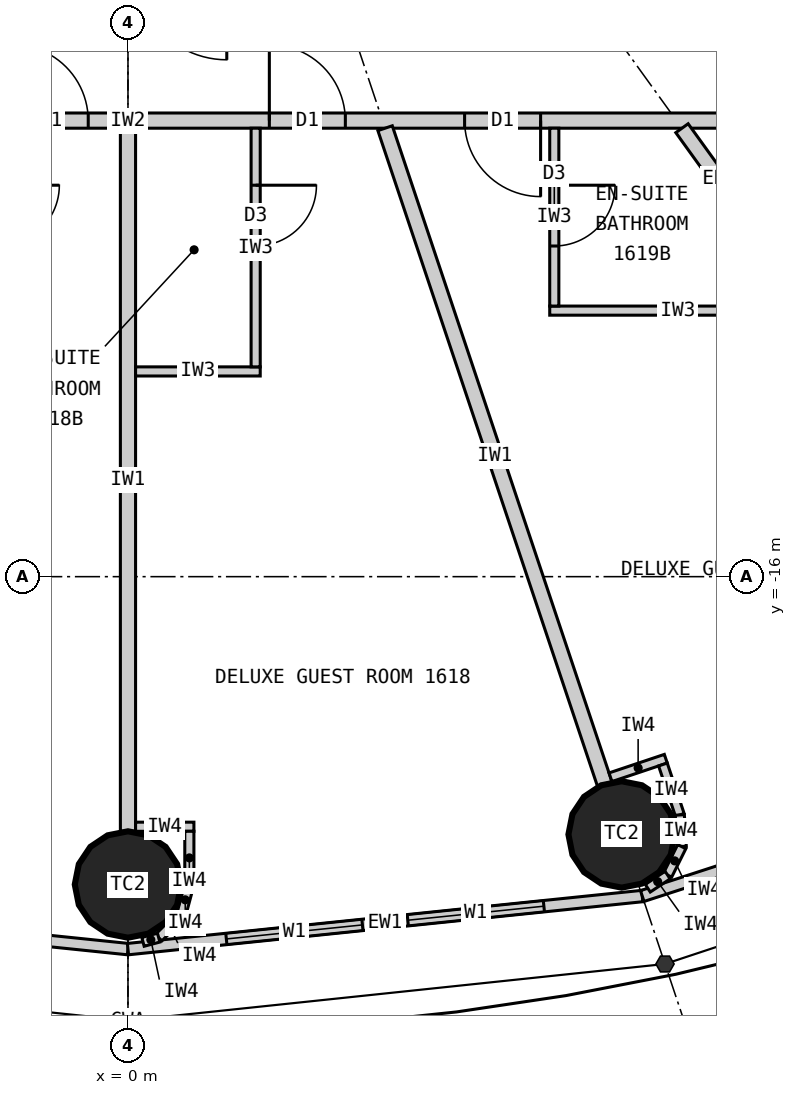
"""IFC4 building model, lengths in metres.
Left out: names, types, materials, properties, quantities, classifications, styles, units other than length and angle.
Written with IfcOpenShell. Run it as: python <this file> out.ifc"""

import sys

from ifc_helpers import new_model, si_unit, direction, frame, frame_2d, origin, origin_2d, place, context, subcontext, project, spatial, rectangle, circle, extrude, element, fill, save


model = new_model("IFC4")
c1 = context("Model", 3, precision=1e-05, world=origin(), true_north=direction((0.0, 1.0)))
c2 = subcontext(c1, "Body", "Model", "MODEL_VIEW")
j1 = project(units=[si_unit("LENGTHUNIT", "METRE"), si_unit("PLANEANGLEUNIT", "RADIAN")], contexts=[c1])
p1 = place(None, origin())
s1 = spatial("IfcSite", under=j1, at=p1, CompositionType="ELEMENT")
p2 = place(p1, origin())
s2 = spatial("IfcBuilding", under=s1, at=p2, CompositionType="ELEMENT")
p3 = place(p2, frame((0.0, 0.0, 67.2)))
s3 = spatial("IfcBuildingStorey", under=s2, at=p3, CompositionType="ELEMENT", Elevation=67.2)
for number, where, z_axis, x_axis in (
    (1, (0.0, -20.05, 0.0), (0.0, 0.0, 1.0), (1.0, 0.0, 0.0)),
    (2, (6.495, -19.391, 0.0), (0.0, 0.0, 1.0), (1.0, 0.0, 0.0)),
):
    element("IfcColumn", number, at=place(p3, frame(where, z_axis=z_axis, x_axis=x_axis)), inside=s3, PredefinedType="COLUMN", context=c2, shape_type="SweptSolid", body=[
        extrude(circle(Radius=0.7, at=origin_2d()), origin(), (0.0, 0.0, 1.0), 3.3),
    ])
p4 = place(p3, frame((-6.766, -20.202, 0.0), z_axis=(0.0, 0.0, 1.0), x_axis=(0.994721394369, -0.102612609291, 0.0)))
e3 = element("IfcWall", 3, at=p4, inside=s3, PredefinedType="ELEMENTEDWALL", context=c2, shape_type="SweptSolid", body=[
    extrude(rectangle(XDim=6.802, YDim=0.15, at=frame_2d((3.401, 0.0))), origin(), (0.0, 0.0, 1.0), 3.12),
])
p5 = place(p4, frame((1.301, 0.0, 0.9)))
e4 = element("IfcOpeningElement", 4, at=p5, cuts=e3, PredefinedType="OPENING", context=c2, shape_type="SweptSolid", body=[
    extrude(rectangle(XDim=1.8, YDim=1.9, at=frame_2d((0.9, 0.95))), frame((0.0, 0.085, 0.0), z_axis=(0.0, -1.0, 0.0), x_axis=(1.0, 0.0, 0.0)), (0.0, 0.0, 1.0), 0.17),
])
p6 = place(p4, frame((3.701, 0.0, 0.9)))
e5 = element("IfcOpeningElement", 5, at=p6, cuts=e3, PredefinedType="OPENING", context=c2, shape_type="SweptSolid", body=[
    extrude(rectangle(XDim=1.8, YDim=1.9, at=frame_2d((0.9, 0.95))), frame((0.0, 0.085, 0.0), z_axis=(0.0, -1.0, 0.0), x_axis=(1.0, 0.0, 0.0)), (0.0, 0.0, 1.0), 0.17),
])
p7 = place(p3, frame((0.0, -20.9, 0.0), z_axis=(0.0, 0.0, 1.0), x_axis=(0.994721394369, 0.102612609291, 0.0)))
e6 = element("IfcWall", 6, at=p7, inside=s3, PredefinedType="ELEMENTEDWALL", context=c2, shape_type="SweptSolid", body=[
    extrude(rectangle(XDim=6.802, YDim=0.15, at=frame_2d((3.401, 0.0))), origin(), (0.0, 0.0, 1.0), 3.12),
])
p8 = place(p7, frame((1.301, 0.0, 0.9)))
e7 = element("IfcOpeningElement", 7, at=p8, cuts=e6, PredefinedType="OPENING", context=c2, shape_type="SweptSolid", body=[
    extrude(rectangle(XDim=1.8, YDim=1.9, at=frame_2d((0.9, 0.95))), frame((0.0, 0.085, 0.0), z_axis=(0.0, -1.0, 0.0), x_axis=(1.0, 0.0, 0.0)), (0.0, 0.0, 1.0), 0.17),
])
p9 = place(p7, frame((3.701, 0.0, 0.9)))
e8 = element("IfcOpeningElement", 8, at=p9, cuts=e6, PredefinedType="OPENING", context=c2, shape_type="SweptSolid", body=[
    extrude(rectangle(XDim=1.8, YDim=1.9, at=frame_2d((0.9, 0.95))), frame((0.0, 0.085, 0.0), z_axis=(0.0, -1.0, 0.0), x_axis=(1.0, 0.0, 0.0)), (0.0, 0.0, 1.0), 0.17),
])
p10 = place(p3, frame((6.766, -20.202, 0.0), z_axis=(0.0, 0.0, 1.0), x_axis=(0.951137534625, 0.308767534285, 0.0)))
e9 = element("IfcWall", 9, at=p10, inside=s3, PredefinedType="ELEMENTEDWALL", context=c2, shape_type="SweptSolid", body=[
    extrude(rectangle(XDim=6.655, YDim=0.15, at=frame_2d((3.328, 0.0))), origin(), (0.0, 0.0, 1.0), 3.12),
])
p11 = place(p10, frame((1.228, 0.0, 0.9)))
e10 = element("IfcOpeningElement", 10, at=p11, cuts=e9, PredefinedType="OPENING", context=c2, shape_type="SweptSolid", body=[
    extrude(rectangle(XDim=1.8, YDim=1.9, at=frame_2d((0.9, 0.95))), frame((0.0, 0.085, 0.0), z_axis=(0.0, -1.0, 0.0), x_axis=(1.0, 0.0, 0.0)), (0.0, 0.0, 1.0), 0.17),
])
p12 = place(p10, frame((3.628, 0.0, 0.9)))
e11 = element("IfcOpeningElement", 11, at=p12, cuts=e9, PredefinedType="OPENING", context=c2, shape_type="SweptSolid", body=[
    extrude(rectangle(XDim=1.8, YDim=1.9, at=frame_2d((0.9, 0.95))), frame((0.0, 0.085, 0.0), z_axis=(0.0, -1.0, 0.0), x_axis=(1.0, 0.0, 0.0)), (0.0, 0.0, 1.0), 0.17),
])
p13 = place(p3, frame((14.1, -10.0, 0.0), z_axis=(0.0, 0.0, 1.0), x_axis=(-1.0, 0.0, 0.0)))
e12 = element("IfcWall", 12, at=p13, inside=s3, PredefinedType="PARTITIONING", context=c2, shape_type="SweptSolid", body=[
    extrude(rectangle(XDim=28.2, YDim=0.2, at=frame_2d((14.1, 0.0))), origin(), (0.0, 0.0, 1.0), 3.12),
])
p14 = place(p13, frame((23.865, 0.0, 0.0)))
e13 = element("IfcOpeningElement", 13, at=p14, cuts=e12, PredefinedType="OPENING", context=c2, shape_type="SweptSolid", body=[
    extrude(rectangle(XDim=1.0, YDim=2.2, at=frame_2d((0.5, 1.1))), frame((0.0, 0.11, 0.0), z_axis=(0.0, -1.0, 0.0), x_axis=(1.0, 0.0, 0.0)), (0.0, 0.0, 1.0), 0.22),
])
p15 = place(p13, frame((18.529, 0.0, 0.0)))
e14 = element("IfcOpeningElement", 14, at=p15, cuts=e12, PredefinedType="OPENING", context=c2, shape_type="SweptSolid", body=[
    extrude(rectangle(XDim=1.0, YDim=2.2, at=frame_2d((0.5, 1.1))), frame((0.0, 0.11, 0.0), z_axis=(0.0, -1.0, 0.0), x_axis=(1.0, 0.0, 0.0)), (0.0, 0.0, 1.0), 0.22),
])
p16 = place(p13, frame((14.623, 0.0, 0.0)))
e15 = element("IfcOpeningElement", 15, at=p16, cuts=e12, PredefinedType="OPENING", context=c2, shape_type="SweptSolid", body=[
    extrude(rectangle(XDim=1.0, YDim=2.2, at=frame_2d((0.5, 1.1))), frame((0.0, 0.11, 0.0), z_axis=(0.0, -1.0, 0.0), x_axis=(1.0, 0.0, 0.0)), (0.0, 0.0, 1.0), 0.22),
])
p17 = place(p13, frame((11.24, 0.0, 0.0)))
e16 = element("IfcOpeningElement", 16, at=p17, cuts=e12, PredefinedType="OPENING", context=c2, shape_type="SweptSolid", body=[
    extrude(rectangle(XDim=1.0, YDim=2.2, at=frame_2d((0.5, 1.1))), frame((0.0, 0.11, 0.0), z_axis=(0.0, -1.0, 0.0), x_axis=(1.0, 0.0, 0.0)), (0.0, 0.0, 1.0), 0.22),
])
p18 = place(p13, frame((8.671, 0.0, 0.0)))
e17 = element("IfcOpeningElement", 17, at=p18, cuts=e12, PredefinedType="OPENING", context=c2, shape_type="SweptSolid", body=[
    extrude(rectangle(XDim=1.0, YDim=2.2, at=frame_2d((0.5, 1.1))), frame((0.0, 0.11, 0.0), z_axis=(0.0, -1.0, 0.0), x_axis=(1.0, 0.0, 0.0)), (0.0, 0.0, 1.0), 0.22),
])
p19 = place(p13, frame((2.801, 0.0, 0.0)))
e18 = element("IfcOpeningElement", 18, at=p19, cuts=e12, PredefinedType="OPENING", context=c2, shape_type="SweptSolid", body=[
    extrude(rectangle(XDim=1.0, YDim=2.2, at=frame_2d((0.5, 1.1))), frame((0.0, 0.11, 0.0), z_axis=(0.0, -1.0, 0.0), x_axis=(1.0, 0.0, 0.0)), (0.0, 0.0, 1.0), 0.22),
])
p20 = place(p3, frame((0.0, -10.1, 0.0), z_axis=(0.0, 0.0, 1.0), x_axis=(0.0, -1.0, 0.0)))
e19 = element("IfcWall", 19, at=p20, inside=s3, PredefinedType="PARTITIONING", context=c2, shape_type="SweptSolid", body=[
    extrude(rectangle(XDim=9.25, YDim=0.2, at=frame_2d((4.625, 0.0))), origin(), (0.0, 0.0, 1.0), 2.32),
])
p21 = place(p3, frame((3.383, -10.1, 0.0), z_axis=(0.0, 0.0, 1.0), x_axis=(0.31759592231, -0.948226149256, 0.0)))
e20 = element("IfcWall", 20, at=p21, inside=s3, PredefinedType="PARTITIONING", context=c2, shape_type="SweptSolid", body=[
    extrude(rectangle(XDim=9.098, YDim=0.2, at=frame_2d((4.549, 0.0))), origin(), (0.0, 0.0, 1.0), 2.32),
])
p22 = place(p3, frame((7.289, -10.1, 0.0), z_axis=(0.0, 0.0, 1.0), x_axis=(0.585198353053, -0.810890182197, 0.0)))
e21 = element("IfcWall", 21, at=p22, inside=s3, PredefinedType="PARTITIONING", context=c2, shape_type="SweptSolid", body=[
    extrude(rectangle(XDim=8.36, YDim=0.2, at=frame_2d((4.18, 0.0))), origin(), (0.0, 0.0, 1.0), 2.32),
])
p23 = place(p3, frame((0.1, -13.3, 0.0), z_axis=(0.0, 0.0, 1.0), x_axis=(1.0, 0.0, 0.0)))
e22 = element("IfcWall", 22, at=p23, inside=s3, PredefinedType="PARTITIONING", context=c2, shape_type="SweptSolid", body=[
    extrude(rectangle(XDim=1.64, YDim=0.12, at=frame_2d((0.82, 0.0))), origin(), (0.0, 0.0, 1.0), 3.12),
])
p24 = place(p3, frame((1.68, -10.1, 0.0), z_axis=(0.0, 0.0, 1.0), x_axis=(0.0, -1.0, 0.0)))
e23 = element("IfcWall", 23, at=p24, inside=s3, PredefinedType="PARTITIONING", context=c2, shape_type="SweptSolid", body=[
    extrude(rectangle(XDim=3.14, YDim=0.12, at=frame_2d((1.57, 0.0))), origin(), (0.0, 0.0, 1.0), 3.12),
])
p25 = place(p24, frame((0.75, 0.0, 0.0)))
e24 = element("IfcOpeningElement", 24, at=p25, cuts=e23, PredefinedType="OPENING", context=c2, shape_type="SweptSolid", body=[
    extrude(rectangle(XDim=0.8, YDim=2.1, at=frame_2d((0.4, 1.05))), frame((0.0, 0.07, 0.0), z_axis=(0.0, -1.0, 0.0), x_axis=(1.0, 0.0, 0.0)), (0.0, 0.0, 1.0), 0.14),
])
p26 = place(p3, frame((8.921, -12.5, 0.0), z_axis=(0.0, 0.0, 1.0), x_axis=(-1.0, 0.0, 0.0)))
e25 = element("IfcWall", 25, at=p26, inside=s3, PredefinedType="PARTITIONING", context=c2, shape_type="SweptSolid", body=[
    extrude(rectangle(XDim=3.372, YDim=0.12, at=frame_2d((1.686, 0.0))), origin(), (0.0, 0.0, 1.0), 3.12),
])
p27 = place(p3, frame((5.609, -10.1, 0.0), z_axis=(0.0, 0.0, 1.0), x_axis=(0.0, -1.0, 0.0)))
e26 = element("IfcWall", 26, at=p27, inside=s3, PredefinedType="PARTITIONING", context=c2, shape_type="SweptSolid", body=[
    extrude(rectangle(XDim=2.34, YDim=0.12, at=frame_2d((1.17, 0.0))), origin(), (0.0, 0.0, 1.0), 3.12),
])
p28 = place(p27, frame((0.75, 0.0, 0.0)))
e27 = element("IfcOpeningElement", 27, at=p28, cuts=e26, PredefinedType="OPENING", context=c2, shape_type="SweptSolid", body=[
    extrude(rectangle(XDim=0.8, YDim=2.1, at=frame_2d((0.4, 1.05))), frame((0.0, 0.07, 0.0), z_axis=(0.0, -1.0, 0.0), x_axis=(1.0, 0.0, 0.0)), (0.0, 0.0, 1.0), 0.14),
])
p29 = place(p3, frame((0.1, -19.29, 0.0), z_axis=(0.0, 0.0, 1.0), x_axis=(1.0, 0.0, 0.0)))
e28 = element("IfcWall", 28, at=p29, inside=s3, PredefinedType="PARTITIONING", context=c2, shape_type="SweptSolid", body=[
    extrude(rectangle(XDim=0.767, YDim=0.12, at=frame_2d((0.384, 0.0))), origin(), (0.0, 0.0, 1.0), 3.12),
])
p30 = place(p3, frame((0.808, -19.35, 0.0), z_axis=(0.0, 0.0, 1.0), x_axis=(0.0, -1.0, 0.0)))
e29 = element("IfcWall", 29, at=p30, inside=s3, PredefinedType="PARTITIONING", context=c2, shape_type="SweptSolid", body=[
    extrude(rectangle(XDim=0.7, YDim=0.12, at=frame_2d((0.35, 0.0))), origin(), (0.0, 0.0, 1.0), 3.12),
])
p31 = place(p3, frame((0.808, -20.05, 0.0), z_axis=(0.0, 0.0, 1.0), x_axis=(-0.2592614205, -0.965807183573, 0.0)))
e30 = element("IfcWall", 30, at=p31, inside=s3, PredefinedType="PARTITIONING", context=c2, shape_type="SweptSolid", body=[
    extrude(rectangle(XDim=0.418, YDim=0.12, at=frame_2d((0.209, 0.0))), origin(), (0.0, 0.0, 1.0), 3.12),
])
p32 = place(p3, frame((0.699, -20.454, 0.0), z_axis=(0.0, 0.0, 1.0), x_axis=(-0.707106781187, -0.707106781187, 0.0)))
e31 = element("IfcWall", 31, at=p32, inside=s3, PredefinedType="PARTITIONING", context=c2, shape_type="SweptSolid", body=[
    extrude(rectangle(XDim=0.418, YDim=0.12, at=frame_2d((0.209, 0.0))), origin(), (0.0, 0.0, 1.0), 3.12),
])
p33 = place(p3, frame((0.404, -20.749, 0.0), z_axis=(0.0, 0.0, 1.0), x_axis=(-0.965759066438, -0.25944060128, 0.0)))
e32 = element("IfcWall", 32, at=p33, inside=s3, PredefinedType="PARTITIONING", context=c2, shape_type="SweptSolid", body=[
    extrude(rectangle(XDim=0.214, YDim=0.12, at=frame_2d((0.107, 0.0))), origin(), (0.0, 0.0, 1.0), 3.12),
])
p34 = place(p3, frame((6.348, -18.639, 0.0), z_axis=(0.0, 0.0, 1.0), x_axis=(0.948268951266, 0.317468102437, 0.0)))
e33 = element("IfcWall", 33, at=p34, inside=s3, PredefinedType="PARTITIONING", context=c2, shape_type="SweptSolid", body=[
    extrude(rectangle(XDim=0.768, YDim=0.12, at=frame_2d((0.384, 0.0))), origin(), (0.0, 0.0, 1.0), 3.12),
])
p35 = place(p3, frame((7.038, -18.471, 0.0), z_axis=(0.0, 0.0, 1.0), x_axis=(0.317378466199, -0.9482989556, 0.0)))
e34 = element("IfcWall", 34, at=p35, inside=s3, PredefinedType="PARTITIONING", context=c2, shape_type="SweptSolid", body=[
    extrude(rectangle(XDim=0.7, YDim=0.12, at=frame_2d((0.35, 0.0))), origin(), (0.0, 0.0, 1.0), 3.12),
])
p36 = place(p3, frame((7.26, -19.135, 0.0), z_axis=(0.0, 0.0, 1.0), x_axis=(0.0613238046, -0.99811792439, 0.0)))
e35 = element("IfcWall", 35, at=p36, inside=s3, PredefinedType="PARTITIONING", context=c2, shape_type="SweptSolid", body=[
    extrude(rectangle(XDim=0.418, YDim=0.12, at=frame_2d((0.209, 0.0))), origin(), (0.0, 0.0, 1.0), 3.12),
])
p37 = place(p3, frame((7.286, -19.552, 0.0), z_axis=(0.0, 0.0, 1.0), x_axis=(-0.445810757773, -0.89512723579, 0.0)))
e36 = element("IfcWall", 36, at=p37, inside=s3, PredefinedType="PARTITIONING", context=c2, shape_type="SweptSolid", body=[
    extrude(rectangle(XDim=0.418, YDim=0.12, at=frame_2d((0.209, 0.0))), origin(), (0.0, 0.0, 1.0), 3.12),
])
p38 = place(p3, frame((7.1, -19.926, 0.0), z_axis=(0.0, 0.0, 1.0), x_axis=(-0.833488262509, -0.552537162787, 0.0)))
e37 = element("IfcWall", 37, at=p38, inside=s3, PredefinedType="PARTITIONING", context=c2, shape_type="SweptSolid", body=[
    extrude(rectangle(XDim=0.313, YDim=0.12, at=frame_2d((0.156, 0.0))), origin(), (0.0, 0.0, 1.0), 3.12),
])
p39 = place(p8, origin())
e38 = element("IfcWindow", 38, at=p39, inside=s3, PartitioningType="SINGLE_PANEL", PredefinedType="WINDOW", context=c2, shape_type="SweptSolid", body=[
    extrude(rectangle(XDim=1.8, YDim=1.9, at=frame_2d((0.9, 0.95))), frame((0.0, 0.03, 0.0), z_axis=(0.0, -1.0, 0.0), x_axis=(1.0, 0.0, 0.0)), (0.0, 0.0, 1.0), 0.06),
])
fill(e7, e38)
p40 = place(p9, origin())
e39 = element("IfcWindow", 39, at=p40, inside=s3, PartitioningType="SINGLE_PANEL", PredefinedType="WINDOW", context=c2, shape_type="SweptSolid", body=[
    extrude(rectangle(XDim=1.8, YDim=1.9, at=frame_2d((0.9, 0.95))), frame((0.0, 0.03, 0.0), z_axis=(0.0, -1.0, 0.0), x_axis=(1.0, 0.0, 0.0)), (0.0, 0.0, 1.0), 0.06),
])
fill(e8, e39)
p41 = place(p16, origin())
e40 = element("IfcDoor", 40, at=p41, inside=s3, OperationType="SINGLE_SWING_RIGHT", PredefinedType="DOOR", context=c2, shape_type="SweptSolid", body=[
    extrude(rectangle(XDim=1.0, YDim=2.2, at=frame_2d((0.5, 1.1))), frame((0.0, 0.025, 0.0), z_axis=(0.0, -1.0, 0.0), x_axis=(1.0, 0.0, 0.0)), (0.0, 0.0, 1.0), 0.05),
])
fill(e15, e40)
p42 = place(p25, origin())
e41 = element("IfcDoor", 41, at=p42, inside=s3, OperationType="SINGLE_SWING_LEFT", PredefinedType="DOOR", context=c2, shape_type="SweptSolid", body=[
    extrude(rectangle(XDim=0.8, YDim=2.1, at=frame_2d((0.4, 1.05))), frame((0.0, 0.025, 0.0), z_axis=(0.0, -1.0, 0.0), x_axis=(1.0, 0.0, 0.0)), (0.0, 0.0, 1.0), 0.05),
])
fill(e24, e41)
p43 = place(p17, origin())
e42 = element("IfcDoor", 42, at=p43, inside=s3, OperationType="SINGLE_SWING_RIGHT", PredefinedType="DOOR", context=c2, shape_type="SweptSolid", body=[
    extrude(rectangle(XDim=1.0, YDim=2.2, at=frame_2d((0.5, 1.1))), frame((0.0, 0.025, 0.0), z_axis=(0.0, -1.0, 0.0), x_axis=(1.0, 0.0, 0.0)), (0.0, 0.0, 1.0), 0.05),
])
fill(e16, e42)
p44 = place(p28, origin())
e43 = element("IfcDoor", 43, at=p44, inside=s3, OperationType="SINGLE_SWING_LEFT", PredefinedType="DOOR", context=c2, shape_type="SweptSolid", body=[
    extrude(rectangle(XDim=0.8, YDim=2.1, at=frame_2d((0.4, 1.05))), frame((0.0, 0.025, 0.0), z_axis=(0.0, -1.0, 0.0), x_axis=(1.0, 0.0, 0.0)), (0.0, 0.0, 1.0), 0.05),
])
fill(e27, e43)
p45 = place(p18, origin())
e44 = element("IfcDoor", 44, at=p45, inside=s3, OperationType="SINGLE_SWING_LEFT", PredefinedType="DOOR", context=c2, shape_type="SweptSolid", body=[
    extrude(rectangle(XDim=1.0, YDim=2.2, at=frame_2d((0.5, 1.1))), frame((0.0, 0.025, 0.0), z_axis=(0.0, -1.0, 0.0), x_axis=(1.0, 0.0, 0.0)), (0.0, 0.0, 1.0), 0.05),
])
fill(e17, e44)
save(model, sys.argv[1])
